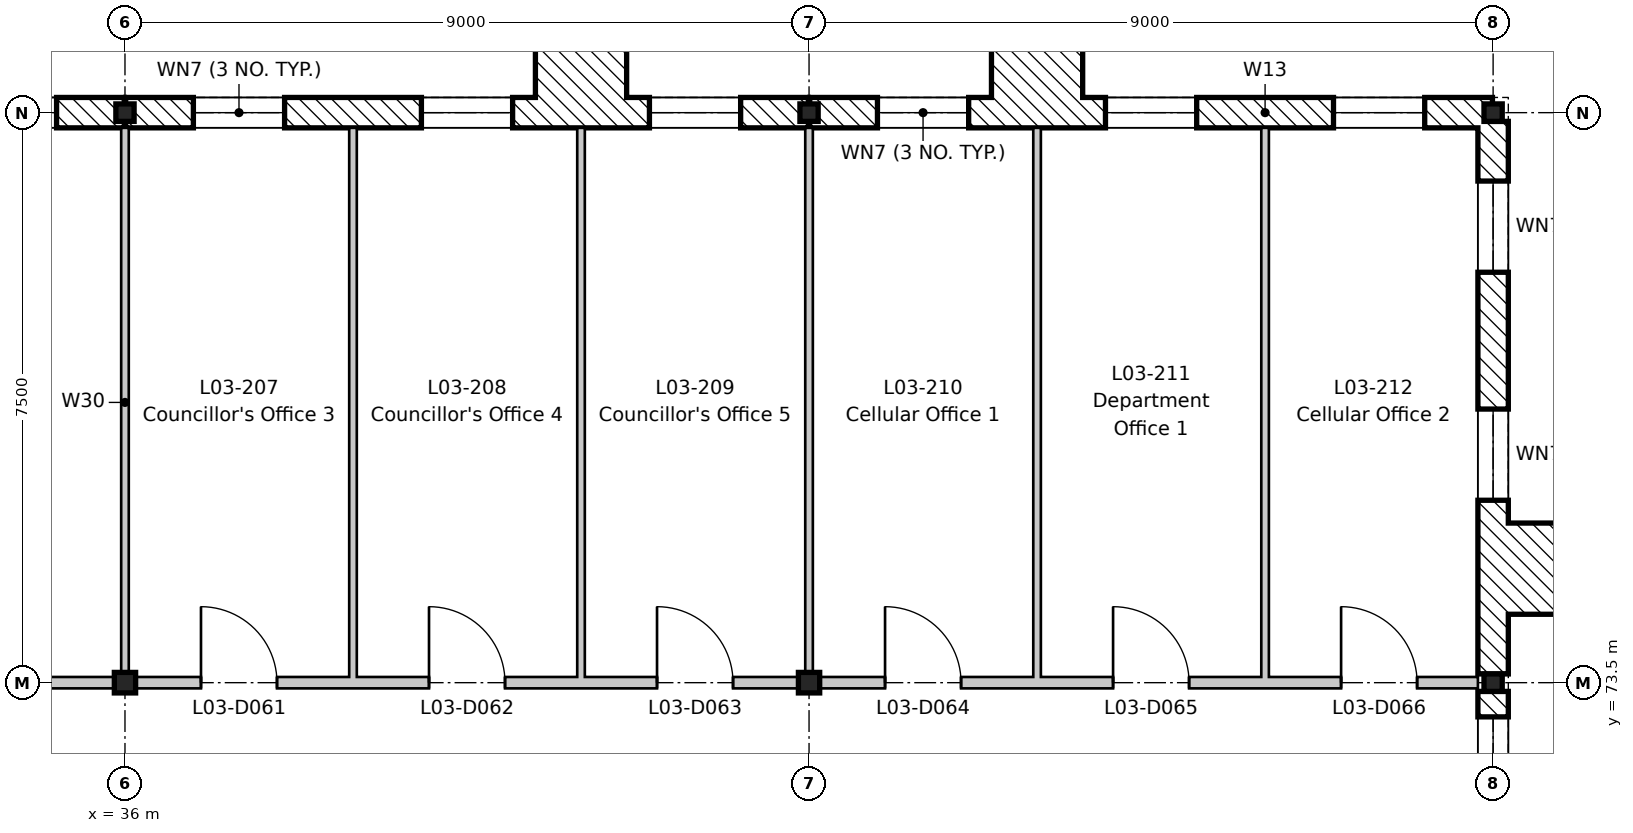
"""IFC4 building model, lengths in metres.
Left out: names, types, materials, properties, quantities, classifications, styles, units other than length and angle.
Written with IfcOpenShell. Run it as: python <this file> out.ifc"""

import sys

from ifc_helpers import new_model, si_unit, direction, frame, frame_2d, origin, origin_2d, place, context, subcontext, project, spatial, rectangle, i_section, extrude, element, fill, save


model = new_model("IFC4")
c1 = context("Model", 3, precision=1e-05, world=origin(), true_north=direction((0.0, 1.0)))
c2 = subcontext(c1, "Body", "Model", "MODEL_VIEW")
j1 = project(units=[si_unit("LENGTHUNIT", "METRE"), si_unit("PLANEANGLEUNIT", "RADIAN")], contexts=[c1])
p1 = place(None, origin())
s1 = spatial("IfcSite", under=j1, at=p1, CompositionType="ELEMENT")
p2 = place(p1, origin())
s2 = spatial("IfcBuilding", under=s1, at=p2, CompositionType="ELEMENT")
p3 = place(p2, frame((0.0, 0.0, 14.4)))
s3 = spatial("IfcBuildingStorey", under=s2, at=p3, CompositionType="ELEMENT", Elevation=14.4)
p4 = place(p3, frame((36.0, 73.5, -0.2), z_axis=(0.0, 0.0, 1.0), x_axis=(1.0, 0.0, 0.0)))
e1 = element("IfcColumn", 1, at=p4, inside=s3, PredefinedType="COLUMN", context=c2, shape_type="SweptSolid", body=[
    extrude(i_section(OverallWidth=0.28, OverallDepth=0.27, WebThickness=0.008, FlangeThickness=0.013, FilletRadius=0.024, at=origin_2d()), origin(), (0.0, 0.0, 1.0), 4.2),
])
p5 = place(p3, frame((36.0, 81.0, -0.2), z_axis=(0.0, 0.0, 1.0), x_axis=(1.0, 0.0, 0.0)))
e2 = element("IfcColumn", 2, at=p5, inside=s3, PredefinedType="COLUMN", context=c2, shape_type="SweptSolid", body=[
    extrude(i_section(OverallWidth=0.24, OverallDepth=0.23, WebThickness=0.008, FlangeThickness=0.012, FilletRadius=0.021, at=origin_2d()), origin(), (0.0, 0.0, 1.0), 4.2),
])
p6 = place(p3, frame((45.0, 73.5, -0.2), z_axis=(0.0, 0.0, 1.0), x_axis=(1.0, 0.0, 0.0)))
e3 = element("IfcColumn", 3, at=p6, inside=s3, PredefinedType="COLUMN", context=c2, shape_type="SweptSolid", body=[
    extrude(i_section(OverallWidth=0.28, OverallDepth=0.27, WebThickness=0.008, FlangeThickness=0.013, FilletRadius=0.024, at=origin_2d()), origin(), (0.0, 0.0, 1.0), 4.2),
])
for number, where, z_axis, x_axis in (
    (4, (45.0, 81.0, -0.2), (0.0, 0.0, 1.0), (1.0, 0.0, 0.0)),
    (5, (54.0, 73.5, -0.2), (0.0, 0.0, 1.0), (1.0, 0.0, 0.0)),
    (6, (54.0, 81.0, -0.2), (0.0, 0.0, 1.0), (1.0, 0.0, 0.0)),
):
    element("IfcColumn", number, at=place(p3, frame(where, z_axis=z_axis, x_axis=x_axis)), inside=s3, PredefinedType="COLUMN", context=c2, shape_type="SweptSolid", body=[
        extrude(i_section(OverallWidth=0.24, OverallDepth=0.23, WebThickness=0.008, FlangeThickness=0.012, FilletRadius=0.021, at=origin_2d()), origin(), (0.0, 0.0, 1.0), 4.2),
    ])
p7 = place(p3, frame((27.009, 81.0, 0.0), z_axis=(0.0, 0.0, 1.0), x_axis=(1.0, 0.0, 0.0)))
e7 = element("IfcWall", 7, at=p7, inside=s3, PredefinedType="STANDARD", context=c2, shape_type="SweptSolid", body=[
    extrude(rectangle(XDim=8.982, YDim=0.4, at=frame_2d((4.491, 0.0))), origin(), (0.0, 0.0, 1.0), 3.6),
])
p8 = place(p7, frame((0.891, 0.0, 0.9)))
e8 = element("IfcOpeningElement", 8, at=p8, cuts=e7, PredefinedType="OPENING", context=c2, shape_type="SweptSolid", body=[
    extrude(rectangle(XDim=1.2, YDim=2.4, at=frame_2d((0.6, 1.2))), frame((0.0, 0.21, 0.0), z_axis=(0.0, -1.0, 0.0), x_axis=(1.0, 0.0, 0.0)), (0.0, 0.0, 1.0), 0.42),
])
p9 = place(p7, frame((3.891, 0.0, 0.9)))
e9 = element("IfcOpeningElement", 9, at=p9, cuts=e7, PredefinedType="OPENING", context=c2, shape_type="SweptSolid", body=[
    extrude(rectangle(XDim=1.2, YDim=2.4, at=frame_2d((0.6, 1.2))), frame((0.0, 0.21, 0.0), z_axis=(0.0, -1.0, 0.0), x_axis=(1.0, 0.0, 0.0)), (0.0, 0.0, 1.0), 0.42),
])
p10 = place(p7, frame((6.891, 0.0, 0.9)))
e10 = element("IfcOpeningElement", 10, at=p10, cuts=e7, PredefinedType="OPENING", context=c2, shape_type="SweptSolid", body=[
    extrude(rectangle(XDim=1.2, YDim=2.4, at=frame_2d((0.6, 1.2))), frame((0.0, 0.21, 0.0), z_axis=(0.0, -1.0, 0.0), x_axis=(1.0, 0.0, 0.0)), (0.0, 0.0, 1.0), 0.42),
])
p11 = place(p3, frame((36.009, 81.0, 0.0), z_axis=(0.0, 0.0, 1.0), x_axis=(1.0, 0.0, 0.0)))
e11 = element("IfcWall", 11, at=p11, inside=s3, PredefinedType="STANDARD", context=c2, shape_type="SweptSolid", body=[
    extrude(rectangle(XDim=8.982, YDim=0.4, at=frame_2d((4.491, 0.0))), origin(), (0.0, 0.0, 1.0), 3.6),
])
p12 = place(p11, frame((0.891, 0.0, 0.9)))
e12 = element("IfcOpeningElement", 12, at=p12, cuts=e11, PredefinedType="OPENING", context=c2, shape_type="SweptSolid", body=[
    extrude(rectangle(XDim=1.2, YDim=2.4, at=frame_2d((0.6, 1.2))), frame((0.0, 0.21, 0.0), z_axis=(0.0, -1.0, 0.0), x_axis=(1.0, 0.0, 0.0)), (0.0, 0.0, 1.0), 0.42),
])
p13 = place(p11, frame((3.891, 0.0, 0.9)))
e13 = element("IfcOpeningElement", 13, at=p13, cuts=e11, PredefinedType="OPENING", context=c2, shape_type="SweptSolid", body=[
    extrude(rectangle(XDim=1.2, YDim=2.4, at=frame_2d((0.6, 1.2))), frame((0.0, 0.21, 0.0), z_axis=(0.0, -1.0, 0.0), x_axis=(1.0, 0.0, 0.0)), (0.0, 0.0, 1.0), 0.42),
])
p14 = place(p11, frame((6.891, 0.0, 0.9)))
e14 = element("IfcOpeningElement", 14, at=p14, cuts=e11, PredefinedType="OPENING", context=c2, shape_type="SweptSolid", body=[
    extrude(rectangle(XDim=1.2, YDim=2.4, at=frame_2d((0.6, 1.2))), frame((0.0, 0.21, 0.0), z_axis=(0.0, -1.0, 0.0), x_axis=(1.0, 0.0, 0.0)), (0.0, 0.0, 1.0), 0.42),
])
p15 = place(p3, frame((45.009, 81.0, 0.0), z_axis=(0.0, 0.0, 1.0), x_axis=(1.0, 0.0, 0.0)))
e15 = element("IfcWall", 15, at=p15, inside=s3, PredefinedType="STANDARD", context=c2, shape_type="SweptSolid", body=[
    extrude(rectangle(XDim=8.982, YDim=0.4, at=frame_2d((4.491, 0.0))), origin(), (0.0, 0.0, 1.0), 3.6),
])
p16 = place(p15, frame((0.891, 0.0, 0.9)))
e16 = element("IfcOpeningElement", 16, at=p16, cuts=e15, PredefinedType="OPENING", context=c2, shape_type="SweptSolid", body=[
    extrude(rectangle(XDim=1.2, YDim=2.4, at=frame_2d((0.6, 1.2))), frame((0.0, 0.21, 0.0), z_axis=(0.0, -1.0, 0.0), x_axis=(1.0, 0.0, 0.0)), (0.0, 0.0, 1.0), 0.42),
])
p17 = place(p15, frame((3.891, 0.0, 0.9)))
e17 = element("IfcOpeningElement", 17, at=p17, cuts=e15, PredefinedType="OPENING", context=c2, shape_type="SweptSolid", body=[
    extrude(rectangle(XDim=1.2, YDim=2.4, at=frame_2d((0.6, 1.2))), frame((0.0, 0.21, 0.0), z_axis=(0.0, -1.0, 0.0), x_axis=(1.0, 0.0, 0.0)), (0.0, 0.0, 1.0), 0.42),
])
p18 = place(p15, frame((6.891, 0.0, 0.9)))
e18 = element("IfcOpeningElement", 18, at=p18, cuts=e15, PredefinedType="OPENING", context=c2, shape_type="SweptSolid", body=[
    extrude(rectangle(XDim=1.2, YDim=2.4, at=frame_2d((0.6, 1.2))), frame((0.0, 0.21, 0.0), z_axis=(0.0, -1.0, 0.0), x_axis=(1.0, 0.0, 0.0)), (0.0, 0.0, 1.0), 0.42),
])
p19 = place(p3, frame((54.0, 73.385, 0.0), z_axis=(0.0, 0.0, 1.0), x_axis=(0.0, -1.0, 0.0)))
e19 = element("IfcWall", 19, at=p19, inside=s3, PredefinedType="STANDARD", context=c2, shape_type="SweptSolid", body=[
    extrude(rectangle(XDim=2.77, YDim=0.4, at=frame_2d((1.385, 0.0))), origin(), (0.0, 0.0, 1.0), 3.8),
])
p20 = place(p19, frame((0.335, 0.0, 0.9)))
e20 = element("IfcOpeningElement", 20, at=p20, cuts=e19, PredefinedType="OPENING", context=c2, shape_type="SweptSolid", body=[
    extrude(rectangle(XDim=2.1, YDim=2.1, at=frame_2d((1.05, 1.05))), frame((0.0, 0.21, 0.0), z_axis=(0.0, -1.0, 0.0), x_axis=(1.0, 0.0, 0.0)), (0.0, 0.0, 1.0), 0.42),
])
p21 = place(p3, frame((54.0, 80.885, 0.0), z_axis=(0.0, 0.0, 1.0), x_axis=(0.0, -1.0, 0.0)))
e21 = element("IfcWall", 21, at=p21, inside=s3, PredefinedType="STANDARD", context=c2, shape_type="SweptSolid", body=[
    extrude(rectangle(XDim=7.27, YDim=0.4, at=frame_2d((3.635, 0.0))), origin(), (0.0, 0.0, 1.0), 3.67),
])
p22 = place(p21, frame((3.785, 0.0, 0.9)))
e22 = element("IfcOpeningElement", 22, at=p22, cuts=e21, PredefinedType="OPENING", context=c2, shape_type="SweptSolid", body=[
    extrude(rectangle(XDim=1.2, YDim=2.4, at=frame_2d((0.6, 1.2))), frame((0.0, 0.21, 0.0), z_axis=(0.0, -1.0, 0.0), x_axis=(1.0, 0.0, 0.0)), (0.0, 0.0, 1.0), 0.42),
])
p23 = place(p21, frame((0.785, 0.0, 0.9)))
e23 = element("IfcOpeningElement", 23, at=p23, cuts=e21, PredefinedType="OPENING", context=c2, shape_type="SweptSolid", body=[
    extrude(rectangle(XDim=1.2, YDim=2.4, at=frame_2d((0.6, 1.2))), frame((0.0, 0.21, 0.0), z_axis=(0.0, -1.0, 0.0), x_axis=(1.0, 0.0, 0.0)), (0.0, 0.0, 1.0), 0.42),
])
for number, where, z_axis, x_axis in (
    (24, (41.4, 81.8, 0.0), (0.0, 0.0, 1.0), (1.0, 0.0, 0.0)),
    (25, (47.4, 81.8, 0.0), (0.0, 0.0, 1.0), (1.0, 0.0, 0.0)),
    (26, (54.8, 74.4, 0.0), (0.0, 0.0, 1.0), (0.0, 1.0, 0.0)),
):
    element("IfcWall", number, at=place(p3, frame(where, z_axis=z_axis, x_axis=x_axis)), inside=s3, PredefinedType="STANDARD", context=c2, shape_type="SweptSolid", body=[
        extrude(rectangle(XDim=1.2, YDim=1.2, at=frame_2d((0.6, 0.0))), origin(), (0.0, 0.0, 1.0), 4.2),
    ])
p24 = place(p3, frame((36.0, 73.575, 0.0), z_axis=(0.0, 0.0, 1.0), x_axis=(0.0, 1.0, 0.0)))
e27 = element("IfcWall", 27, at=p24, inside=s3, PredefinedType="PARTITIONING", context=c2, shape_type="SweptSolid", body=[
    extrude(rectangle(XDim=7.225, YDim=0.1, at=frame_2d((3.613, 0.0))), origin(), (0.0, 0.0, 1.0), 3.65),
])
for number, where, z_axis, x_axis in (
    (28, (39.0, 73.575, 0.0), (0.0, 0.0, 1.0), (0.0, 1.0, 0.0)),
    (29, (42.0, 73.575, 0.0), (0.0, 0.0, 1.0), (0.0, 1.0, 0.0)),
):
    element("IfcWall", number, at=place(p3, frame(where, z_axis=z_axis, x_axis=x_axis)), inside=s3, PredefinedType="PARTITIONING", context=c2, shape_type="SweptSolid", body=[
        extrude(rectangle(XDim=7.225, YDim=0.1, at=frame_2d((3.613, 0.0))), origin(), (0.0, 0.0, 1.0), 4.0),
    ])
p25 = place(p3, frame((45.0, 73.575, 0.0), z_axis=(0.0, 0.0, 1.0), x_axis=(0.0, 1.0, 0.0)))
e30 = element("IfcWall", 30, at=p25, inside=s3, PredefinedType="PARTITIONING", context=c2, shape_type="SweptSolid", body=[
    extrude(rectangle(XDim=7.225, YDim=0.1, at=frame_2d((3.613, 0.0))), origin(), (0.0, 0.0, 1.0), 3.65),
])
for number, where, z_axis, x_axis in (
    (31, (48.0, 73.575, 0.0), (0.0, 0.0, 1.0), (0.0, 1.0, 0.0)),
    (32, (51.0, 73.575, 0.0), (0.0, 0.0, 1.0), (0.0, 1.0, 0.0)),
):
    element("IfcWall", number, at=place(p3, frame(where, z_axis=z_axis, x_axis=x_axis)), inside=s3, PredefinedType="PARTITIONING", context=c2, shape_type="SweptSolid", body=[
        extrude(rectangle(XDim=7.225, YDim=0.1, at=frame_2d((3.613, 0.0))), origin(), (0.0, 0.0, 1.0), 4.0),
    ])
p26 = place(p3, frame((18.0, 73.5, 0.0), z_axis=(0.0, 0.0, 1.0), x_axis=(1.0, 0.0, 0.0)))
e33 = element("IfcWall", 33, at=p26, inside=s3, PredefinedType="PARTITIONING", context=c2, shape_type="SweptSolid", body=[
    extrude(rectangle(XDim=35.8, YDim=0.15, at=frame_2d((17.9, 0.0))), origin(), (0.0, 0.0, 1.0), 3.48),
])
p27 = place(p26, frame((7.05, 0.0, 0.0)))
e34 = element("IfcOpeningElement", 34, at=p27, cuts=e33, PredefinedType="OPENING", context=c2, shape_type="SweptSolid", body=[
    extrude(rectangle(XDim=1.4, YDim=2.1, at=frame_2d((0.7, 1.05))), frame((0.0, 0.085, 0.0), z_axis=(0.0, -1.0, 0.0), x_axis=(1.0, 0.0, 0.0)), (0.0, 0.0, 1.0), 0.17),
])
p28 = place(p26, frame((12.8, 0.0, 0.0)))
e35 = element("IfcOpeningElement", 35, at=p28, cuts=e33, PredefinedType="OPENING", context=c2, shape_type="SweptSolid", body=[
    extrude(rectangle(XDim=1.4, YDim=2.1, at=frame_2d((0.7, 1.05))), frame((0.0, 0.085, 0.0), z_axis=(0.0, -1.0, 0.0), x_axis=(1.0, 0.0, 0.0)), (0.0, 0.0, 1.0), 0.17),
])
p29 = place(p26, frame((19.0, 0.0, 0.0)))
e36 = element("IfcOpeningElement", 36, at=p29, cuts=e33, PredefinedType="OPENING", context=c2, shape_type="SweptSolid", body=[
    extrude(rectangle(XDim=1.0, YDim=2.1, at=frame_2d((0.5, 1.05))), frame((0.0, 0.085, 0.0), z_axis=(0.0, -1.0, 0.0), x_axis=(1.0, 0.0, 0.0)), (0.0, 0.0, 1.0), 0.17),
])
p30 = place(p26, frame((22.0, 0.0, 0.0)))
e37 = element("IfcOpeningElement", 37, at=p30, cuts=e33, PredefinedType="OPENING", context=c2, shape_type="SweptSolid", body=[
    extrude(rectangle(XDim=1.0, YDim=2.1, at=frame_2d((0.5, 1.05))), frame((0.0, 0.085, 0.0), z_axis=(0.0, -1.0, 0.0), x_axis=(1.0, 0.0, 0.0)), (0.0, 0.0, 1.0), 0.17),
])
p31 = place(p26, frame((25.0, 0.0, 0.0)))
e38 = element("IfcOpeningElement", 38, at=p31, cuts=e33, PredefinedType="OPENING", context=c2, shape_type="SweptSolid", body=[
    extrude(rectangle(XDim=1.0, YDim=2.1, at=frame_2d((0.5, 1.05))), frame((0.0, 0.085, 0.0), z_axis=(0.0, -1.0, 0.0), x_axis=(1.0, 0.0, 0.0)), (0.0, 0.0, 1.0), 0.17),
])
p32 = place(p26, frame((28.0, 0.0, 0.0)))
e39 = element("IfcOpeningElement", 39, at=p32, cuts=e33, PredefinedType="OPENING", context=c2, shape_type="SweptSolid", body=[
    extrude(rectangle(XDim=1.0, YDim=2.1, at=frame_2d((0.5, 1.05))), frame((0.0, 0.085, 0.0), z_axis=(0.0, -1.0, 0.0), x_axis=(1.0, 0.0, 0.0)), (0.0, 0.0, 1.0), 0.17),
])
p33 = place(p26, frame((31.0, 0.0, 0.0)))
e40 = element("IfcOpeningElement", 40, at=p33, cuts=e33, PredefinedType="OPENING", context=c2, shape_type="SweptSolid", body=[
    extrude(rectangle(XDim=1.0, YDim=2.1, at=frame_2d((0.5, 1.05))), frame((0.0, 0.085, 0.0), z_axis=(0.0, -1.0, 0.0), x_axis=(1.0, 0.0, 0.0)), (0.0, 0.0, 1.0), 0.17),
])
p34 = place(p26, frame((34.0, 0.0, 0.0)))
e41 = element("IfcOpeningElement", 41, at=p34, cuts=e33, PredefinedType="OPENING", context=c2, shape_type="SweptSolid", body=[
    extrude(rectangle(XDim=1.0, YDim=2.1, at=frame_2d((0.5, 1.05))), frame((0.0, 0.085, 0.0), z_axis=(0.0, -1.0, 0.0), x_axis=(1.0, 0.0, 0.0)), (0.0, 0.0, 1.0), 0.17),
])
p35 = place(p10, origin())
e42 = element("IfcWindow", 42, at=p35, inside=s3, PartitioningType="SINGLE_PANEL", PredefinedType="WINDOW", context=c2, shape_type="SweptSolid", body=[
    extrude(rectangle(XDim=1.2, YDim=2.4, at=frame_2d((0.6, 1.2))), frame((0.0, -0.12, 0.0), z_axis=(0.0, -1.0, 0.0), x_axis=(1.0, 0.0, 0.0)), (0.0, 0.0, 1.0), 0.06),
])
fill(e10, e42)
p36 = place(p12, origin())
e43 = element("IfcWindow", 43, at=p36, inside=s3, PartitioningType="SINGLE_PANEL", PredefinedType="WINDOW", context=c2, shape_type="SweptSolid", body=[
    extrude(rectangle(XDim=1.2, YDim=2.4, at=frame_2d((0.6, 1.2))), frame((0.0, -0.12, 0.0), z_axis=(0.0, -1.0, 0.0), x_axis=(1.0, 0.0, 0.0)), (0.0, 0.0, 1.0), 0.06),
])
fill(e12, e43)
p37 = place(p13, origin())
e44 = element("IfcWindow", 44, at=p37, inside=s3, PartitioningType="SINGLE_PANEL", PredefinedType="WINDOW", context=c2, shape_type="SweptSolid", body=[
    extrude(rectangle(XDim=1.2, YDim=2.4, at=frame_2d((0.6, 1.2))), frame((0.0, -0.12, 0.0), z_axis=(0.0, -1.0, 0.0), x_axis=(1.0, 0.0, 0.0)), (0.0, 0.0, 1.0), 0.06),
])
fill(e13, e44)
p38 = place(p14, origin())
e45 = element("IfcWindow", 45, at=p38, inside=s3, PartitioningType="SINGLE_PANEL", PredefinedType="WINDOW", context=c2, shape_type="SweptSolid", body=[
    extrude(rectangle(XDim=1.2, YDim=2.4, at=frame_2d((0.6, 1.2))), frame((0.0, -0.12, 0.0), z_axis=(0.0, -1.0, 0.0), x_axis=(1.0, 0.0, 0.0)), (0.0, 0.0, 1.0), 0.06),
])
fill(e14, e45)
p39 = place(p16, origin())
e46 = element("IfcWindow", 46, at=p39, inside=s3, PartitioningType="SINGLE_PANEL", PredefinedType="WINDOW", context=c2, shape_type="SweptSolid", body=[
    extrude(rectangle(XDim=1.2, YDim=2.4, at=frame_2d((0.6, 1.2))), frame((0.0, -0.12, 0.0), z_axis=(0.0, -1.0, 0.0), x_axis=(1.0, 0.0, 0.0)), (0.0, 0.0, 1.0), 0.06),
])
fill(e16, e46)
p40 = place(p17, origin())
e47 = element("IfcWindow", 47, at=p40, inside=s3, PartitioningType="SINGLE_PANEL", PredefinedType="WINDOW", context=c2, shape_type="SweptSolid", body=[
    extrude(rectangle(XDim=1.2, YDim=2.4, at=frame_2d((0.6, 1.2))), frame((0.0, -0.12, 0.0), z_axis=(0.0, -1.0, 0.0), x_axis=(1.0, 0.0, 0.0)), (0.0, 0.0, 1.0), 0.06),
])
fill(e17, e47)
p41 = place(p18, origin())
e48 = element("IfcWindow", 48, at=p41, inside=s3, PartitioningType="SINGLE_PANEL", PredefinedType="WINDOW", context=c2, shape_type="SweptSolid", body=[
    extrude(rectangle(XDim=1.2, YDim=2.4, at=frame_2d((0.6, 1.2))), frame((0.0, -0.12, 0.0), z_axis=(0.0, -1.0, 0.0), x_axis=(1.0, 0.0, 0.0)), (0.0, 0.0, 1.0), 0.06),
])
fill(e18, e48)
p42 = place(p20, origin())
e49 = element("IfcWindow", 49, at=p42, inside=s3, PartitioningType="SINGLE_PANEL", PredefinedType="WINDOW", context=c2, shape_type="SweptSolid", body=[
    extrude(rectangle(XDim=2.1, YDim=2.1, at=frame_2d((1.05, 1.05))), frame((0.0, -0.12, 0.0), z_axis=(0.0, -1.0, 0.0), x_axis=(1.0, 0.0, 0.0)), (0.0, 0.0, 1.0), 0.06),
])
fill(e20, e49)
p43 = place(p22, origin())
e50 = element("IfcWindow", 50, at=p43, inside=s3, PartitioningType="SINGLE_PANEL", PredefinedType="WINDOW", context=c2, shape_type="SweptSolid", body=[
    extrude(rectangle(XDim=1.2, YDim=2.4, at=frame_2d((0.6, 1.2))), frame((0.0, -0.12, 0.0), z_axis=(0.0, -1.0, 0.0), x_axis=(1.0, 0.0, 0.0)), (0.0, 0.0, 1.0), 0.06),
])
fill(e22, e50)
p44 = place(p23, origin())
e51 = element("IfcWindow", 51, at=p44, inside=s3, PartitioningType="SINGLE_PANEL", PredefinedType="WINDOW", context=c2, shape_type="SweptSolid", body=[
    extrude(rectangle(XDim=1.2, YDim=2.4, at=frame_2d((0.6, 1.2))), frame((0.0, -0.12, 0.0), z_axis=(0.0, -1.0, 0.0), x_axis=(1.0, 0.0, 0.0)), (0.0, 0.0, 1.0), 0.06),
])
fill(e23, e51)
p45 = place(p29, origin())
e52 = element("IfcDoor", 52, at=p45, inside=s3, OperationType="SINGLE_SWING_LEFT", PredefinedType="DOOR", context=c2, shape_type="SweptSolid", body=[
    extrude(rectangle(XDim=1.0, YDim=2.1, at=frame_2d((0.5, 1.05))), frame((0.0, 0.025, 0.0), z_axis=(0.0, -1.0, 0.0), x_axis=(1.0, 0.0, 0.0)), (0.0, 0.0, 1.0), 0.05),
])
fill(e36, e52)
p46 = place(p30, origin())
e53 = element("IfcDoor", 53, at=p46, inside=s3, OperationType="SINGLE_SWING_LEFT", PredefinedType="DOOR", context=c2, shape_type="SweptSolid", body=[
    extrude(rectangle(XDim=1.0, YDim=2.1, at=frame_2d((0.5, 1.05))), frame((0.0, 0.025, 0.0), z_axis=(0.0, -1.0, 0.0), x_axis=(1.0, 0.0, 0.0)), (0.0, 0.0, 1.0), 0.05),
])
fill(e37, e53)
p47 = place(p31, origin())
e54 = element("IfcDoor", 54, at=p47, inside=s3, OperationType="SINGLE_SWING_LEFT", PredefinedType="DOOR", context=c2, shape_type="SweptSolid", body=[
    extrude(rectangle(XDim=1.0, YDim=2.1, at=frame_2d((0.5, 1.05))), frame((0.0, 0.025, 0.0), z_axis=(0.0, -1.0, 0.0), x_axis=(1.0, 0.0, 0.0)), (0.0, 0.0, 1.0), 0.05),
])
fill(e38, e54)
p48 = place(p32, origin())
e55 = element("IfcDoor", 55, at=p48, inside=s3, OperationType="SINGLE_SWING_LEFT", PredefinedType="DOOR", context=c2, shape_type="SweptSolid", body=[
    extrude(rectangle(XDim=1.0, YDim=2.1, at=frame_2d((0.5, 1.05))), frame((0.0, 0.025, 0.0), z_axis=(0.0, -1.0, 0.0), x_axis=(1.0, 0.0, 0.0)), (0.0, 0.0, 1.0), 0.05),
])
fill(e39, e55)
p49 = place(p33, origin())
e56 = element("IfcDoor", 56, at=p49, inside=s3, OperationType="SINGLE_SWING_LEFT", PredefinedType="DOOR", context=c2, shape_type="SweptSolid", body=[
    extrude(rectangle(XDim=1.0, YDim=2.1, at=frame_2d((0.5, 1.05))), frame((0.0, 0.025, 0.0), z_axis=(0.0, -1.0, 0.0), x_axis=(1.0, 0.0, 0.0)), (0.0, 0.0, 1.0), 0.05),
])
fill(e40, e56)
p50 = place(p34, origin())
e57 = element("IfcDoor", 57, at=p50, inside=s3, OperationType="SINGLE_SWING_LEFT", PredefinedType="DOOR", context=c2, shape_type="SweptSolid", body=[
    extrude(rectangle(XDim=1.0, YDim=2.1, at=frame_2d((0.5, 1.05))), frame((0.0, 0.025, 0.0), z_axis=(0.0, -1.0, 0.0), x_axis=(1.0, 0.0, 0.0)), (0.0, 0.0, 1.0), 0.05),
])
fill(e41, e57)
save(model, sys.argv[1])
